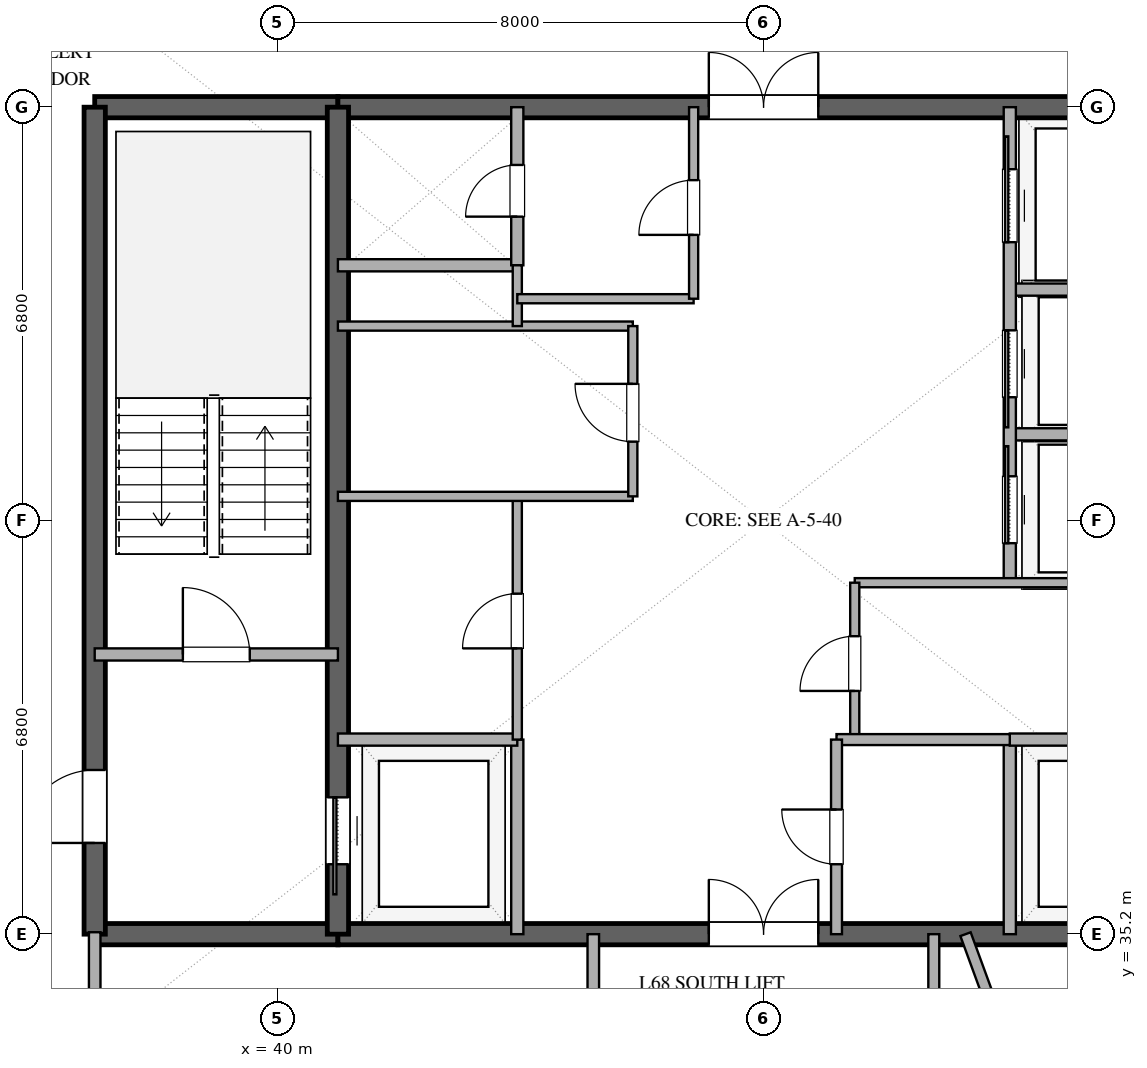
"""IFC4 building model, lengths in metres.
Left out: names, types, materials, properties, quantities, classifications, styles, units other than length and angle.
Written with IfcOpenShell. Run it as: python <this file> out.ifc"""

import sys

from ifc_helpers import new_model, si_unit, direction, frame, frame_2d, origin, place, context, subcontext, project, spatial, rectangle, extrude, element, fill, save


model = new_model("IFC4")
c1 = context("Model", 3, precision=1e-05, world=origin(), true_north=direction((0.0, 1.0)))
c2 = subcontext(c1, "Body", "Model", "MODEL_VIEW")
j1 = project(units=[si_unit("LENGTHUNIT", "METRE"), si_unit("PLANEANGLEUNIT", "RADIAN")], contexts=[c1])
p1 = place(None, origin())
s1 = spatial("IfcSite", under=j1, at=p1, CompositionType="ELEMENT")
p2 = place(p1, origin())
s2 = spatial("IfcBuilding", under=s1, at=p2, CompositionType="ELEMENT")
p3 = place(p2, frame((0.0, 0.0, 265.8)))
s3 = spatial("IfcBuildingStorey", under=s2, at=p3, CompositionType="ELEMENT", Elevation=265.8)
p4 = place(p3, frame((37.0, 35.2, 0.0), z_axis=(0.0, 0.0, 1.0), x_axis=(1.0, 0.0, 0.0)))
e1 = element("IfcWall", 1, at=p4, inside=s3, PredefinedType="SHEAR", context=c2, shape_type="SweptSolid", body=[
    extrude(rectangle(XDim=4.0, YDim=0.35, at=frame_2d((2.0, 0.0))), origin(), (0.0, 0.0, 1.0), 3.37),
])
p5 = place(p3, frame((41.0, 35.2, 0.0), z_axis=(0.0, 0.0, 1.0), x_axis=(1.0, 0.0, 0.0)))
e2 = element("IfcWall", 2, at=p5, inside=s3, PredefinedType="SHEAR", context=c2, shape_type="SweptSolid", body=[
    extrude(rectangle(XDim=14.0, YDim=0.35, at=frame_2d((7.0, 0.0))), origin(), (0.0, 0.0, 1.0), 3.37),
])
p6 = place(p5, frame((6.1, 0.0, 0.0)))
e3 = element("IfcOpeningElement", 3, at=p6, cuts=e2, PredefinedType="OPENING", context=c2, shape_type="SweptSolid", body=[
    extrude(rectangle(XDim=1.8, YDim=2.25, at=frame_2d((0.9, 1.125))), frame((0.0, 0.185, 0.0), z_axis=(0.0, -1.0, 0.0), x_axis=(1.0, 0.0, 0.0)), (0.0, 0.0, 1.0), 0.37),
])
p7 = place(p3, frame((37.0, 48.8, 0.0), z_axis=(0.0, 0.0, 1.0), x_axis=(1.0, 0.0, 0.0)))
e4 = element("IfcWall", 4, at=p7, inside=s3, PredefinedType="SHEAR", context=c2, shape_type="SweptSolid", body=[
    extrude(rectangle(XDim=4.0, YDim=0.35, at=frame_2d((2.0, 0.0))), origin(), (0.0, 0.0, 1.0), 3.37),
])
p8 = place(p3, frame((41.0, 48.8, 0.0), z_axis=(0.0, 0.0, 1.0), x_axis=(1.0, 0.0, 0.0)))
e5 = element("IfcWall", 5, at=p8, inside=s3, PredefinedType="SHEAR", context=c2, shape_type="SweptSolid", body=[
    extrude(rectangle(XDim=14.0, YDim=0.35, at=frame_2d((7.0, 0.0))), origin(), (0.0, 0.0, 1.0), 3.37),
])
p9 = place(p8, frame((6.1, 0.0, 0.0)))
e6 = element("IfcOpeningElement", 6, at=p9, cuts=e5, PredefinedType="OPENING", context=c2, shape_type="SweptSolid", body=[
    extrude(rectangle(XDim=1.8, YDim=2.25, at=frame_2d((0.9, 1.125))), frame((0.0, 0.185, 0.0), z_axis=(0.0, -1.0, 0.0), x_axis=(1.0, 0.0, 0.0)), (0.0, 0.0, 1.0), 0.37),
])
p10 = place(p3, frame((37.0, 35.2, 0.0), z_axis=(0.0, 0.0, 1.0), x_axis=(0.0, 1.0, 0.0)))
e7 = element("IfcWall", 7, at=p10, inside=s3, PredefinedType="SHEAR", context=c2, shape_type="SweptSolid", body=[
    extrude(rectangle(XDim=13.6, YDim=0.35, at=frame_2d((6.8, 0.0))), origin(), (0.0, 0.0, 1.0), 3.37),
])
p11 = place(p10, frame((1.5, 0.0, 0.0)))
e8 = element("IfcOpeningElement", 8, at=p11, cuts=e7, PredefinedType="OPENING", context=c2, shape_type="SweptSolid", body=[
    extrude(rectangle(XDim=1.2, YDim=2.15, at=frame_2d((0.6, 1.075))), frame((0.0, 0.185, 0.0), z_axis=(0.0, -1.0, 0.0), x_axis=(1.0, 0.0, 0.0)), (0.0, 0.0, 1.0), 0.37),
])
p12 = place(p3, frame((41.0, 35.2, 0.0), z_axis=(0.0, 0.0, 1.0), x_axis=(0.0, 1.0, 0.0)))
e9 = element("IfcWall", 9, at=p12, inside=s3, PredefinedType="SHEAR", context=c2, shape_type="SweptSolid", body=[
    extrude(rectangle(XDim=13.6, YDim=0.35, at=frame_2d((6.8, 0.0))), origin(), (0.0, 0.0, 1.0), 3.37),
])
p13 = place(p12, frame((1.15, 0.0, 0.0)))
e10 = element("IfcOpeningElement", 10, at=p13, cuts=e9, PredefinedType="OPENING", context=c2, shape_type="SweptSolid", body=[
    extrude(rectangle(XDim=1.1, YDim=2.2, at=frame_2d((0.55, 1.1))), frame((0.0, 0.185, 0.0), z_axis=(0.0, -1.0, 0.0), x_axis=(1.0, 0.0, 0.0)), (0.0, 0.0, 1.0), 0.37),
])
p14 = place(p3, frame((37.0, 39.8, 0.0), z_axis=(0.0, 0.0, 1.0), x_axis=(1.0, 0.0, 0.0)))
e11 = element("IfcWall", 11, at=p14, inside=s3, PredefinedType="SOLIDWALL", context=c2, shape_type="SweptSolid", body=[
    extrude(rectangle(XDim=4.0, YDim=0.2, at=frame_2d((2.0, 0.0))), origin(), (0.0, 0.0, 1.0), 2.73),
])
p15 = place(p14, frame((1.45, 0.0, 0.0)))
e12 = element("IfcOpeningElement", 12, at=p15, cuts=e11, PredefinedType="OPENING", context=c2, shape_type="SweptSolid", body=[
    extrude(rectangle(XDim=1.1, YDim=2.15, at=frame_2d((0.55, 1.075))), frame((0.0, 0.11, 0.0), z_axis=(0.0, -1.0, 0.0), x_axis=(1.0, 0.0, 0.0)), (0.0, 0.0, 1.0), 0.22),
])
p16 = place(p3, frame((43.95, 35.2, 0.0), z_axis=(0.0, 0.0, 1.0), x_axis=(0.0, 1.0, 0.0)))
e13 = element("IfcWall", 13, at=p16, inside=s3, PredefinedType="SOLIDWALL", context=c2, shape_type="SweptSolid", body=[
    extrude(rectangle(XDim=3.2, YDim=0.2, at=frame_2d((1.6, 0.0))), origin(), (0.0, 0.0, 1.0), 2.73),
])
p17 = place(p3, frame((41.0, 38.4, 0.0), z_axis=(0.0, 0.0, 1.0), x_axis=(1.0, 0.0, 0.0)))
e14 = element("IfcWall", 14, at=p17, inside=s3, PredefinedType="SOLIDWALL", context=c2, shape_type="SweptSolid", body=[
    extrude(rectangle(XDim=2.95, YDim=0.2, at=frame_2d((1.475, 0.0))), origin(), (0.0, 0.0, 1.0), 2.73),
])
p18 = place(p3, frame((52.05, 35.2, 0.0), z_axis=(0.0, 0.0, 1.0), x_axis=(0.0, 1.0, 0.0)))
e15 = element("IfcWall", 15, at=p18, inside=s3, PredefinedType="SOLIDWALL", context=c2, shape_type="SweptSolid", body=[
    extrude(rectangle(XDim=3.2, YDim=0.2, at=frame_2d((1.6, 0.0))), origin(), (0.0, 0.0, 1.0), 2.73),
])
for number, where, z_axis, x_axis in (
    (16, (52.05, 38.4, 0.0), (0.0, 0.0, 1.0), (1.0, 0.0, 0.0)),
    (17, (41.0, 46.2, 0.0), (0.0, 0.0, 1.0), (1.0, 0.0, 0.0)),
):
    element("IfcWall", number, at=place(p3, frame(where, z_axis=z_axis, x_axis=x_axis)), inside=s3, PredefinedType="SOLIDWALL", context=c2, shape_type="SweptSolid", body=[
        extrude(rectangle(XDim=2.95, YDim=0.2, at=frame_2d((1.475, 0.0))), origin(), (0.0, 0.0, 1.0), 2.73),
    ])
p19 = place(p3, frame((43.95, 46.2, 0.0), z_axis=(0.0, 0.0, 1.0), x_axis=(0.0, 1.0, 0.0)))
e18 = element("IfcWall", 18, at=p19, inside=s3, PredefinedType="SOLIDWALL", context=c2, shape_type="SweptSolid", body=[
    extrude(rectangle(XDim=2.6, YDim=0.2, at=frame_2d((1.3, 0.0))), origin(), (0.0, 0.0, 1.0), 2.73),
])
p20 = place(p19, frame((0.8, 0.0, 0.0)))
e19 = element("IfcOpeningElement", 19, at=p20, cuts=e18, PredefinedType="OPENING", context=c2, shape_type="SweptSolid", body=[
    extrude(rectangle(XDim=0.85, YDim=2.15, at=frame_2d((0.425, 1.075))), frame((0.0, 0.11, 0.0), z_axis=(0.0, -1.0, 0.0), x_axis=(1.0, 0.0, 0.0)), (0.0, 0.0, 1.0), 0.22),
])
p21 = place(p3, frame((43.95, 38.4, 0.0), z_axis=(0.0, 0.0, 1.0), x_axis=(0.0, 1.0, 0.0)))
e20 = element("IfcWall", 20, at=p21, inside=s3, PredefinedType="PARTITIONING", context=c2, shape_type="SweptSolid", body=[
    extrude(rectangle(XDim=4.0, YDim=0.15, at=frame_2d((2.0, 0.0))), origin(), (0.0, 0.0, 1.0), 2.73),
])
p22 = place(p21, frame((1.5, 0.0, 0.0)))
e21 = element("IfcOpeningElement", 21, at=p22, cuts=e20, PredefinedType="OPENING", context=c2, shape_type="SweptSolid", body=[
    extrude(rectangle(XDim=0.9, YDim=2.15, at=frame_2d((0.45, 1.075))), frame((0.0, 0.085, 0.0), z_axis=(0.0, -1.0, 0.0), x_axis=(1.0, 0.0, 0.0)), (0.0, 0.0, 1.0), 0.17),
])
for number, where, z_axis, x_axis in (
    (22, (41.0, 42.4, 0.0), (0.0, 0.0, 1.0), (1.0, 0.0, 0.0)),
    (23, (41.0, 45.2, 0.0), (0.0, 0.0, 1.0), (1.0, 0.0, 0.0)),
):
    element("IfcWall", number, at=place(p3, frame(where, z_axis=z_axis, x_axis=x_axis)), inside=s3, PredefinedType="PARTITIONING", context=c2, shape_type="SweptSolid", body=[
        extrude(rectangle(XDim=4.85, YDim=0.15, at=frame_2d((2.425, 0.0))), origin(), (0.0, 0.0, 1.0), 2.73),
    ])
p23 = place(p3, frame((43.95, 45.2, 0.0), z_axis=(0.0, 0.0, 1.0), x_axis=(0.0, 1.0, 0.0)))
e24 = element("IfcWall", 24, at=p23, inside=s3, PredefinedType="PARTITIONING", context=c2, shape_type="SweptSolid", body=[
    extrude(rectangle(XDim=1.0, YDim=0.15, at=frame_2d((0.5, 0.0))), origin(), (0.0, 0.0, 1.0), 2.73),
])
p24 = place(p3, frame((45.85, 42.4, 0.0), z_axis=(0.0, 0.0, 1.0), x_axis=(0.0, 1.0, 0.0)))
e25 = element("IfcWall", 25, at=p24, inside=s3, PredefinedType="PARTITIONING", context=c2, shape_type="SweptSolid", body=[
    extrude(rectangle(XDim=2.8, YDim=0.15, at=frame_2d((1.4, 0.0))), origin(), (0.0, 0.0, 1.0), 2.73),
])
p25 = place(p24, frame((0.9, 0.0, 0.0)))
e26 = element("IfcOpeningElement", 26, at=p25, cuts=e25, PredefinedType="OPENING", context=c2, shape_type="SweptSolid", body=[
    extrude(rectangle(XDim=0.95, YDim=2.15, at=frame_2d((0.475, 1.075))), frame((0.0, 0.085, 0.0), z_axis=(0.0, -1.0, 0.0), x_axis=(1.0, 0.0, 0.0)), (0.0, 0.0, 1.0), 0.17),
])
for number, where, z_axis, x_axis in (
    (27, (52.05, 43.42, 0.0), (0.0, 0.0, 1.0), (1.0, 0.0, 0.0)),
    (28, (52.05, 45.8, 0.0), (0.0, 0.0, 1.0), (1.0, 0.0, 0.0)),
):
    element("IfcWall", number, at=place(p3, frame(where, z_axis=z_axis, x_axis=x_axis)), inside=s3, PredefinedType="SOLIDWALL", context=c2, shape_type="SweptSolid", body=[
        extrude(rectangle(XDim=2.95, YDim=0.2, at=frame_2d((1.475, 0.0))), origin(), (0.0, 0.0, 1.0), 2.73),
    ])
p26 = place(p3, frame((52.05, 40.98, 0.0), z_axis=(0.0, 0.0, 1.0), x_axis=(0.0, 1.0, 0.0)))
e29 = element("IfcWall", 29, at=p26, inside=s3, PredefinedType="SOLIDWALL", context=c2, shape_type="SweptSolid", body=[
    extrude(rectangle(XDim=7.82, YDim=0.2, at=frame_2d((3.91, 0.0))), origin(), (0.0, 0.0, 1.0), 2.73),
])
p27 = place(p26, frame((0.65, 0.0, 0.0)))
e30 = element("IfcOpeningElement", 30, at=p27, cuts=e29, PredefinedType="OPENING", context=c2, shape_type="SweptSolid", body=[
    extrude(rectangle(XDim=1.1, YDim=2.2, at=frame_2d((0.55, 1.1))), frame((0.0, 0.11, 0.0), z_axis=(0.0, -1.0, 0.0), x_axis=(1.0, 0.0, 0.0)), (0.0, 0.0, 1.0), 0.22),
])
p28 = place(p26, frame((3.05, 0.0, 0.0)))
e31 = element("IfcOpeningElement", 31, at=p28, cuts=e29, PredefinedType="OPENING", context=c2, shape_type="SweptSolid", body=[
    extrude(rectangle(XDim=1.1, YDim=2.2, at=frame_2d((0.55, 1.1))), frame((0.0, 0.11, 0.0), z_axis=(0.0, -1.0, 0.0), x_axis=(1.0, 0.0, 0.0)), (0.0, 0.0, 1.0), 0.22),
])
p29 = place(p26, frame((5.6, 0.0, 0.0)))
e32 = element("IfcOpeningElement", 32, at=p29, cuts=e29, PredefinedType="OPENING", context=c2, shape_type="SweptSolid", body=[
    extrude(rectangle(XDim=1.2, YDim=2.2, at=frame_2d((0.6, 1.1))), frame((0.0, 0.11, 0.0), z_axis=(0.0, -1.0, 0.0), x_axis=(1.0, 0.0, 0.0)), (0.0, 0.0, 1.0), 0.22),
])
p30 = place(p3, frame((49.5, 40.98, 0.0), z_axis=(0.0, 0.0, 1.0), x_axis=(1.0, 0.0, 0.0)))
e33 = element("IfcWall", 33, at=p30, inside=s3, PredefinedType="PARTITIONING", context=c2, shape_type="SweptSolid", body=[
    extrude(rectangle(XDim=5.5, YDim=0.15, at=frame_2d((2.75, 0.0))), origin(), (0.0, 0.0, 1.0), 2.73),
])
p31 = place(p3, frame((49.5, 38.4, 0.0), z_axis=(0.0, 0.0, 1.0), x_axis=(0.0, 1.0, 0.0)))
e34 = element("IfcWall", 34, at=p31, inside=s3, PredefinedType="PARTITIONING", context=c2, shape_type="SweptSolid", body=[
    extrude(rectangle(XDim=2.58, YDim=0.15, at=frame_2d((1.29, 0.0))), origin(), (0.0, 0.0, 1.0), 2.73),
])
p32 = place(p31, frame((0.8, 0.0, 0.0)))
e35 = element("IfcOpeningElement", 35, at=p32, cuts=e34, PredefinedType="OPENING", context=c2, shape_type="SweptSolid", body=[
    extrude(rectangle(XDim=0.9, YDim=2.15, at=frame_2d((0.45, 1.075))), frame((0.0, 0.085, 0.0), z_axis=(0.0, -1.0, 0.0), x_axis=(1.0, 0.0, 0.0)), (0.0, 0.0, 1.0), 0.17),
])
p33 = place(p3, frame((43.95, 45.65, 0.0), z_axis=(0.0, 0.0, 1.0), x_axis=(1.0, 0.0, 0.0)))
e36 = element("IfcWall", 36, at=p33, inside=s3, PredefinedType="PARTITIONING", context=c2, shape_type="SweptSolid", body=[
    extrude(rectangle(XDim=2.9, YDim=0.15, at=frame_2d((1.45, 0.0))), origin(), (0.0, 0.0, 1.0), 2.73),
])
p34 = place(p3, frame((46.85, 45.65, 0.0), z_axis=(0.0, 0.0, 1.0), x_axis=(0.0, 1.0, 0.0)))
e37 = element("IfcWall", 37, at=p34, inside=s3, PredefinedType="PARTITIONING", context=c2, shape_type="SweptSolid", body=[
    extrude(rectangle(XDim=3.15, YDim=0.15, at=frame_2d((1.575, 0.0))), origin(), (0.0, 0.0, 1.0), 2.73),
])
p35 = place(p34, frame((1.05, 0.0, 0.0)))
e38 = element("IfcOpeningElement", 38, at=p35, cuts=e37, PredefinedType="OPENING", context=c2, shape_type="SweptSolid", body=[
    extrude(rectangle(XDim=0.9, YDim=2.15, at=frame_2d((0.45, 1.075))), frame((0.0, 0.085, 0.0), z_axis=(0.0, -1.0, 0.0), x_axis=(1.0, 0.0, 0.0)), (0.0, 0.0, 1.0), 0.17),
])
p36 = place(p3, frame((49.2, 38.4, 0.0), z_axis=(0.0, 0.0, 1.0), x_axis=(1.0, 0.0, 0.0)))
e39 = element("IfcWall", 39, at=p36, inside=s3, PredefinedType="PLUMBINGWALL", context=c2, shape_type="SweptSolid", body=[
    extrude(rectangle(XDim=2.85, YDim=0.18, at=frame_2d((1.425, 0.0))), origin(), (0.0, 0.0, 1.0), 2.73),
])
p37 = place(p3, frame((49.2, 35.2, 0.0), z_axis=(0.0, 0.0, 1.0), x_axis=(0.0, 1.0, 0.0)))
e40 = element("IfcWall", 40, at=p37, inside=s3, PredefinedType="PLUMBINGWALL", context=c2, shape_type="SweptSolid", body=[
    extrude(rectangle(XDim=3.2, YDim=0.18, at=frame_2d((1.6, 0.0))), origin(), (0.0, 0.0, 1.0), 2.73),
])
p38 = place(p37, frame((1.15, 0.0, 0.0)))
e41 = element("IfcOpeningElement", 41, at=p38, cuts=e40, PredefinedType="OPENING", context=c2, shape_type="SweptSolid", body=[
    extrude(rectangle(XDim=0.9, YDim=2.1, at=frame_2d((0.45, 1.05))), frame((0.0, 0.1, 0.0), z_axis=(0.0, -1.0, 0.0), x_axis=(1.0, 0.0, 0.0)), (0.0, 0.0, 1.0), 0.2),
])
p39 = place(p3, frame((51.322, 35.2, 0.0), z_axis=(0.0, 0.0, 1.0), x_axis=(0.343730484072, -0.939068343796, 0.0)))
e42 = element("IfcWall", 42, at=p39, inside=s3, PredefinedType="PLUMBINGWALL", context=c2, shape_type="SweptSolid", body=[
    extrude(rectangle(XDim=7.897, YDim=0.18, at=frame_2d((3.949, 0.0))), origin(), (0.0, 0.0, 1.0), 2.73),
])
p40 = place(p39, frame((3.524, 0.0, 0.0)))
e43 = element("IfcOpeningElement", 43, at=p40, cuts=e42, PredefinedType="OPENING", context=c2, shape_type="SweptSolid", body=[
    extrude(rectangle(XDim=0.85, YDim=2.1, at=frame_2d((0.425, 1.05))), frame((0.0, 0.1, 0.0), z_axis=(0.0, -1.0, 0.0), x_axis=(1.0, 0.0, 0.0)), (0.0, 0.0, 1.0), 0.2),
])
p41 = place(p3, frame((45.2, 35.2, 0.0), z_axis=(0.0, 0.0, 1.0), x_axis=(0.0, -1.0, 0.0)))
e44 = element("IfcWall", 44, at=p41, inside=s3, PredefinedType="PARTITIONING", context=c2, shape_type="SweptSolid", body=[
    extrude(rectangle(XDim=2.1, YDim=0.19, at=frame_2d((1.05, 0.0))), origin(), (0.0, 0.0, 1.0), 2.73),
])
p42 = place(p3, frame((50.8, 35.2, 0.0), z_axis=(0.0, 0.0, 1.0), x_axis=(0.0, -1.0, 0.0)))
e45 = element("IfcWall", 45, at=p42, inside=s3, PredefinedType="PLUMBINGWALL", context=c2, shape_type="SweptSolid", body=[
    extrude(rectangle(XDim=2.1, YDim=0.18, at=frame_2d((1.05, 0.0))), origin(), (0.0, 0.0, 1.0), 2.73),
])
p43 = place(p3, frame((37.0, 35.232, 0.0), z_axis=(0.0, 0.0, 1.0), x_axis=(0.0, -1.0, 0.0)))
e46 = element("IfcWall", 46, at=p43, inside=s3, PredefinedType="PARTITIONING", context=c2, shape_type="SweptSolid", body=[
    extrude(rectangle(XDim=1.232, YDim=0.19, at=frame_2d((0.616, 0.0))), origin(), (0.0, 0.0, 1.0), 2.73),
])
p44 = place(p13, origin())
e47 = element("IfcDoor", 47, at=p44, inside=s3, OperationType="SLIDING_TO_LEFT", PredefinedType="DOOR", context=c2, shape_type="SweptSolid", body=[
    extrude(rectangle(XDim=1.1, YDim=2.2, at=frame_2d((0.55, 1.1))), frame((0.0, 0.025, 0.0), z_axis=(0.0, -1.0, 0.0), x_axis=(1.0, 0.0, 0.0)), (0.0, 0.0, 1.0), 0.05),
])
fill(e10, e47)
p45 = place(p11, origin())
e48 = element("IfcDoor", 48, at=p45, inside=s3, OperationType="SINGLE_SWING_LEFT", PredefinedType="DOOR", context=c2, shape_type="SweptSolid", body=[
    extrude(rectangle(XDim=1.2, YDim=2.15, at=frame_2d((0.6, 1.075))), frame((0.0, 0.025, 0.0), z_axis=(0.0, -1.0, 0.0), x_axis=(1.0, 0.0, 0.0)), (0.0, 0.0, 1.0), 0.05),
])
fill(e8, e48)
p46 = place(p6, origin())
e49 = element("IfcDoor", 49, at=p46, inside=s3, OperationType="DOUBLE_DOOR_SINGLE_SWING", PredefinedType="DOOR", context=c2, shape_type="SweptSolid", body=[
    extrude(rectangle(XDim=1.8, YDim=2.25, at=frame_2d((0.9, 1.125))), frame((0.0, 0.025, 0.0), z_axis=(0.0, -1.0, 0.0), x_axis=(1.0, 0.0, 0.0)), (0.0, 0.0, 1.0), 0.05),
])
fill(e3, e49)
p47 = place(p9, origin())
e50 = element("IfcDoor", 50, at=p47, inside=s3, OperationType="DOUBLE_DOOR_SINGLE_SWING", PredefinedType="DOOR", context=c2, shape_type="SweptSolid", body=[
    extrude(rectangle(XDim=1.8, YDim=2.25, at=frame_2d((0.9, 1.125))), frame((0.0, 0.025, 0.0), z_axis=(0.0, -1.0, 0.0), x_axis=(1.0, 0.0, 0.0)), (0.0, 0.0, 1.0), 0.05),
])
fill(e6, e50)
p48 = place(p15, origin())
e51 = element("IfcDoor", 51, at=p48, inside=s3, OperationType="SINGLE_SWING_LEFT", PredefinedType="DOOR", context=c2, shape_type="SweptSolid", body=[
    extrude(rectangle(XDim=1.1, YDim=2.15, at=frame_2d((0.55, 1.075))), frame((0.0, 0.025, 0.0), z_axis=(0.0, -1.0, 0.0), x_axis=(1.0, 0.0, 0.0)), (0.0, 0.0, 1.0), 0.05),
])
fill(e12, e51)
p49 = place(p20, origin())
e52 = element("IfcDoor", 52, at=p49, inside=s3, OperationType="SINGLE_SWING_LEFT", PredefinedType="DOOR", context=c2, shape_type="SweptSolid", body=[
    extrude(rectangle(XDim=0.85, YDim=2.15, at=frame_2d((0.425, 1.075))), frame((0.0, 0.025, 0.0), z_axis=(0.0, -1.0, 0.0), x_axis=(1.0, 0.0, 0.0)), (0.0, 0.0, 1.0), 0.05),
])
fill(e19, e52)
p50 = place(p22, origin())
e53 = element("IfcDoor", 53, at=p50, inside=s3, OperationType="SINGLE_SWING_LEFT", PredefinedType="DOOR", context=c2, shape_type="SweptSolid", body=[
    extrude(rectangle(XDim=0.9, YDim=2.15, at=frame_2d((0.45, 1.075))), frame((0.0, 0.025, 0.0), z_axis=(0.0, -1.0, 0.0), x_axis=(1.0, 0.0, 0.0)), (0.0, 0.0, 1.0), 0.05),
])
fill(e21, e53)
p51 = place(p25, origin())
e54 = element("IfcDoor", 54, at=p51, inside=s3, OperationType="SINGLE_SWING_RIGHT", PredefinedType="DOOR", context=c2, shape_type="SweptSolid", body=[
    extrude(rectangle(XDim=0.95, YDim=2.15, at=frame_2d((0.475, 1.075))), frame((0.0, 0.025, 0.0), z_axis=(0.0, -1.0, 0.0), x_axis=(1.0, 0.0, 0.0)), (0.0, 0.0, 1.0), 0.05),
])
fill(e26, e54)
p52 = place(p27, origin())
e55 = element("IfcDoor", 55, at=p52, inside=s3, OperationType="SLIDING_TO_RIGHT", PredefinedType="DOOR", context=c2, shape_type="SweptSolid", body=[
    extrude(rectangle(XDim=1.1, YDim=2.2, at=frame_2d((0.55, 1.1))), frame((0.0, 0.025, 0.0), z_axis=(0.0, -1.0, 0.0), x_axis=(1.0, 0.0, 0.0)), (0.0, 0.0, 1.0), 0.05),
])
fill(e30, e55)
p53 = place(p28, origin())
e56 = element("IfcDoor", 56, at=p53, inside=s3, OperationType="SLIDING_TO_LEFT", PredefinedType="DOOR", context=c2, shape_type="SweptSolid", body=[
    extrude(rectangle(XDim=1.1, YDim=2.2, at=frame_2d((0.55, 1.1))), frame((0.0, 0.025, 0.0), z_axis=(0.0, -1.0, 0.0), x_axis=(1.0, 0.0, 0.0)), (0.0, 0.0, 1.0), 0.05),
])
fill(e31, e56)
p54 = place(p29, origin())
e57 = element("IfcDoor", 57, at=p54, inside=s3, OperationType="SLIDING_TO_RIGHT", PredefinedType="DOOR", context=c2, shape_type="SweptSolid", body=[
    extrude(rectangle(XDim=1.2, YDim=2.2, at=frame_2d((0.6, 1.1))), frame((0.0, 0.025, 0.0), z_axis=(0.0, -1.0, 0.0), x_axis=(1.0, 0.0, 0.0)), (0.0, 0.0, 1.0), 0.05),
])
fill(e32, e57)
p55 = place(p32, origin())
e58 = element("IfcDoor", 58, at=p55, inside=s3, OperationType="SINGLE_SWING_LEFT", PredefinedType="DOOR", context=c2, shape_type="SweptSolid", body=[
    extrude(rectangle(XDim=0.9, YDim=2.15, at=frame_2d((0.45, 1.075))), frame((0.0, 0.025, 0.0), z_axis=(0.0, -1.0, 0.0), x_axis=(1.0, 0.0, 0.0)), (0.0, 0.0, 1.0), 0.05),
])
fill(e35, e58)
p56 = place(p35, origin())
e59 = element("IfcDoor", 59, at=p56, inside=s3, OperationType="SINGLE_SWING_LEFT", PredefinedType="DOOR", context=c2, shape_type="SweptSolid", body=[
    extrude(rectangle(XDim=0.9, YDim=2.15, at=frame_2d((0.45, 1.075))), frame((0.0, 0.025, 0.0), z_axis=(0.0, -1.0, 0.0), x_axis=(1.0, 0.0, 0.0)), (0.0, 0.0, 1.0), 0.05),
])
fill(e38, e59)
p57 = place(p38, origin())
e60 = element("IfcDoor", 60, at=p57, inside=s3, OperationType="SINGLE_SWING_RIGHT", PredefinedType="DOOR", context=c2, shape_type="SweptSolid", body=[
    extrude(rectangle(XDim=0.9, YDim=2.1, at=frame_2d((0.45, 1.05))), frame((0.0, 0.025, 0.0), z_axis=(0.0, -1.0, 0.0), x_axis=(1.0, 0.0, 0.0)), (0.0, 0.0, 1.0), 0.05),
])
fill(e41, e60)
save(model, sys.argv[1])
